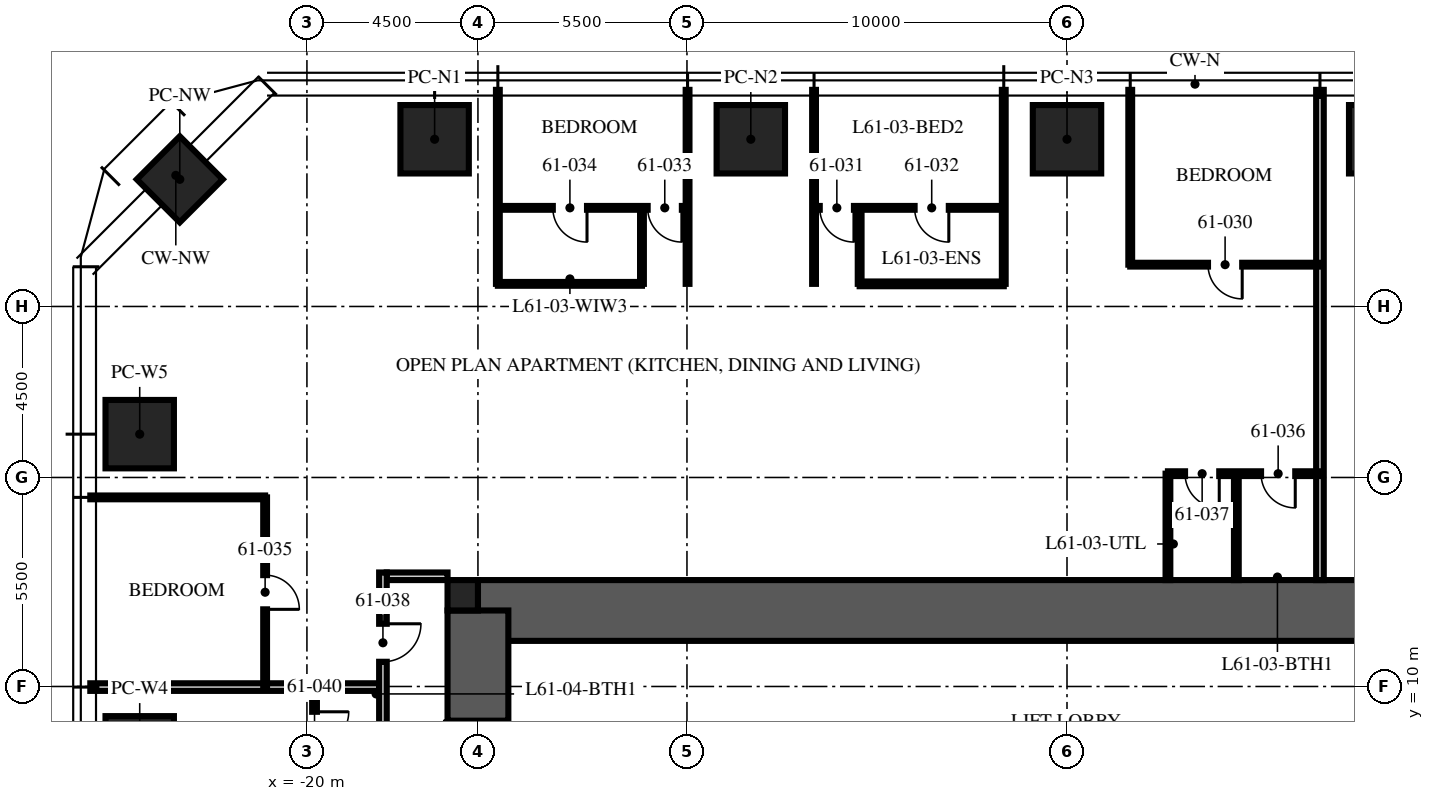
"""IFC4 building model, lengths in metres.
Left out: names, types, materials, properties, quantities, classifications, styles, units other than length and angle.
Written with IfcOpenShell. Run it as: python <this file> out.ifc"""

import sys

from ifc_helpers import new_model, si_unit, direction, frame, frame_2d, origin, origin_2d, place, context, subcontext, project, spatial, rectangle, extrude, element, fill, save


model = new_model("IFC4")
c1 = context("Model", 3, precision=1e-05, world=origin(), true_north=direction((0.0, 1.0)))
c2 = subcontext(c1, "Body", "Model", "MODEL_VIEW")
j1 = project(units=[si_unit("LENGTHUNIT", "METRE"), si_unit("PLANEANGLEUNIT", "RADIAN")], contexts=[c1])
p1 = place(None, origin())
s1 = spatial("IfcSite", under=j1, at=p1, CompositionType="ELEMENT")
p2 = place(p1, origin())
s2 = spatial("IfcBuilding", under=s1, at=p2, CompositionType="ELEMENT")
p3 = place(p2, frame((0.0, 0.0, 244.5)))
s3 = spatial("IfcBuildingStorey", under=s2, at=p3, CompositionType="ELEMENT", Elevation=244.5)
p4 = place(p3, frame((-15.5, 12.0, -0.25), z_axis=(0.0, 0.0, 1.0), x_axis=(1.0, 0.0, 0.0)))
e1 = element("IfcWall", 1, at=p4, inside=s3, PredefinedType="SHEAR", context=c2, shape_type="SweptSolid", body=[
    extrude(rectangle(XDim=31.0, YDim=1.6, at=frame_2d((15.5, 0.0))), origin(), (0.0, 0.0, 1.0), 3.75),
])
p5 = place(p3, frame((-15.5, -12.0, -0.25), z_axis=(0.0, 0.0, 1.0), x_axis=(0.0, 1.0, 0.0)))
e2 = element("IfcWall", 2, at=p5, inside=s3, PredefinedType="SHEAR", context=c2, shape_type="SweptSolid", body=[
    extrude(rectangle(XDim=24.0, YDim=1.6, at=frame_2d((12.0, 0.0))), origin(), (0.0, 0.0, 1.0), 3.75),
])
p6 = place(p5, frame((3.2, 0.0, 0.25)))
e3 = element("IfcOpeningElement", 3, at=p6, cuts=e2, PredefinedType="OPENING", context=c2, shape_type="SweptSolid", body=[
    extrude(rectangle(XDim=1.2, YDim=2.1, at=frame_2d((0.6, 1.05))), frame((0.0, 0.81, 0.0), z_axis=(0.0, -1.0, 0.0), x_axis=(1.0, 0.0, 0.0)), (0.0, 0.0, 1.0), 1.62),
])
p7 = place(p5, frame((19.3, 0.0, 0.25)))
e4 = element("IfcOpeningElement", 4, at=p7, cuts=e2, PredefinedType="OPENING", context=c2, shape_type="SweptSolid", body=[
    extrude(rectangle(XDim=1.8, YDim=2.1, at=frame_2d((0.9, 1.05))), frame((0.0, 0.81, 0.0), z_axis=(0.0, -1.0, 0.0), x_axis=(1.0, 0.0, 0.0)), (0.0, 0.0, 1.0), 1.62),
])
p8 = place(p3, frame((-15.9, 12.4, -0.25), z_axis=(0.0, 0.0, 1.0), x_axis=(1.0, 0.0, 0.0)))
e5 = element("IfcColumn", 5, at=p8, inside=s3, PredefinedType="COLUMN", context=c2, shape_type="SweptSolid", body=[
    extrude(rectangle(XDim=0.8, YDim=0.8, at=origin_2d()), origin(), (0.0, 0.0, 1.0), 3.75),
])
for number, where, z_axis, x_axis in (
    (6, (-16.64, 24.4, 0.0), (0.0, 0.0, 1.0), (1.0, 0.0, 0.0)),
    (7, (-8.32, 24.4, 0.0), (0.0, 0.0, 1.0), (1.0, 0.0, 0.0)),
    (8, (0.0, 24.4, 0.0), (0.0, 0.0, 1.0), (1.0, 0.0, 0.0)),
    (9, (8.32, 24.4, 0.0), (0.0, 0.0, 1.0), (1.0, 0.0, 0.0)),
    (10, (-24.4, 8.32, 0.0), (0.0, 0.0, 1.0), (0.0, 1.0, 0.0)),
    (11, (-24.4, 16.64, 0.0), (0.0, 0.0, 1.0), (0.0, 1.0, 0.0)),
):
    element("IfcColumn", number, at=place(p3, frame(where, z_axis=z_axis, x_axis=x_axis)), inside=s3, PredefinedType="COLUMN", context=c2, shape_type="SweptSolid", body=[
        extrude(rectangle(XDim=1.8, YDim=1.8, at=origin_2d()), origin(), (0.0, 0.0, 1.0), 3.75),
    ])
p9 = place(p3, frame((-23.346, 23.346, 0.0), z_axis=(0.0, 0.0, 1.0), x_axis=(0.707106781187, 0.707106781187, 0.0)))
e12 = element("IfcColumn", 12, at=p9, inside=s3, PredefinedType="COLUMN", context=c2, shape_type="SweptSolid", body=[
    extrude(rectangle(XDim=1.6, YDim=1.6, at=origin_2d()), origin(), (0.0, 0.0, 1.0), 3.75),
])
p10 = place(p3, frame((-16.3, 12.9, 0.0), z_axis=(0.0, 0.0, 1.0), x_axis=(-1.0, 0.0, 0.0)))
e13 = element("IfcWall", 13, at=p10, inside=s3, PredefinedType="PARTITIONING", context=c2, shape_type="SweptSolid", body=[
    extrude(rectangle(XDim=1.6, YDim=0.2, at=frame_2d((0.8, 0.0))), origin(), (0.0, 0.0, 1.0), 2.3),
])
p11 = place(p3, frame((6.656, 12.8, 0.0), z_axis=(0.0, 0.0, 1.0), x_axis=(0.0, 1.0, 0.0)))
e14 = element("IfcWall", 14, at=p11, inside=s3, PredefinedType="PARTITIONING", context=c2, shape_type="SweptSolid", body=[
    extrude(rectangle(XDim=12.9, YDim=0.2, at=frame_2d((6.45, 0.0))), origin(), (0.0, 0.0, 1.0), 2.91),
])
p12 = place(p3, frame((1.664, 21.1, 0.0), z_axis=(0.0, 0.0, 1.0), x_axis=(0.0, 1.0, 0.0)))
e15 = element("IfcWall", 15, at=p12, inside=s3, PredefinedType="PARTITIONING", context=c2, shape_type="SweptSolid", body=[
    extrude(rectangle(XDim=4.6, YDim=0.1, at=frame_2d((2.3, 0.0))), origin(), (0.0, 0.0, 1.0), 2.91),
])
for number, where, z_axis, x_axis in (
    (16, (-1.664, 20.595, 0.0), (0.0, 0.0, 1.0), (0.0, 1.0, 0.0)),
    (17, (-6.656, 20.595, 0.0), (0.0, 0.0, 1.0), (0.0, 1.0, 0.0)),
    (18, (-9.984, 20.595, 0.0), (0.0, 0.0, 1.0), (0.0, 1.0, 0.0)),
    (19, (-14.976, 20.595, 0.0), (0.0, 0.0, 1.0), (0.0, 1.0, 0.0)),
):
    element("IfcWall", number, at=place(p3, frame(where, z_axis=z_axis, x_axis=x_axis)), inside=s3, PredefinedType="PARTITIONING", context=c2, shape_type="SweptSolid", body=[
        extrude(rectangle(XDim=5.105, YDim=0.1, at=frame_2d((2.552, 0.0))), origin(), (0.0, 0.0, 1.0), 2.91),
    ])
p13 = place(p3, frame((-21.1, 14.976, 0.0), z_axis=(0.0, 0.0, 1.0), x_axis=(-1.0, 0.0, 0.0)))
e20 = element("IfcWall", 20, at=p13, inside=s3, PredefinedType="PARTITIONING", context=c2, shape_type="SweptSolid", body=[
    extrude(rectangle(XDim=4.6, YDim=0.1, at=frame_2d((2.3, 0.0))), origin(), (0.0, 0.0, 1.0), 2.91),
])
p14 = place(p3, frame((-18.1, 9.984, 0.0), z_axis=(0.0, 0.0, 1.0), x_axis=(-1.0, 0.0, 0.0)))
e21 = element("IfcWall", 21, at=p14, inside=s3, PredefinedType="PARTITIONING", context=c2, shape_type="SweptSolid", body=[
    extrude(rectangle(XDim=7.6, YDim=0.2, at=frame_2d((3.8, 0.0))), origin(), (0.0, 0.0, 1.0), 2.91),
])
p15 = place(p3, frame((6.656, 21.1, 0.0), z_axis=(0.0, 0.0, 1.0), x_axis=(-1.0, 0.0, 0.0)))
e22 = element("IfcWall", 22, at=p15, inside=s3, PredefinedType="PARTITIONING", context=c2, shape_type="SweptSolid", body=[
    extrude(rectangle(XDim=4.992, YDim=0.1, at=frame_2d((2.496, 0.0))), origin(), (0.0, 0.0, 1.0), 2.81),
])
p16 = place(p15, frame((2.046, 0.0, 0.0)))
e23 = element("IfcOpeningElement", 23, at=p16, cuts=e22, PredefinedType="OPENING", context=c2, shape_type="SweptSolid", body=[
    extrude(rectangle(XDim=0.9, YDim=2.1, at=frame_2d((0.45, 1.05))), frame((0.0, 0.06, 0.0), z_axis=(0.0, -1.0, 0.0), x_axis=(1.0, 0.0, 0.0)), (0.0, 0.0, 1.0), 0.12),
])
p17 = place(p3, frame((-1.664, 22.595, 0.0), z_axis=(0.0, 0.0, 1.0), x_axis=(-1.0, 0.0, 0.0)))
e24 = element("IfcWall", 24, at=p17, inside=s3, PredefinedType="PARTITIONING", context=c2, shape_type="SweptSolid", body=[
    extrude(rectangle(XDim=4.992, YDim=0.1, at=frame_2d((2.496, 0.0))), origin(), (0.0, 0.0, 1.0), 2.81),
])
p18 = place(p17, frame((3.942, 0.0, 0.0)))
e25 = element("IfcOpeningElement", 25, at=p18, cuts=e24, PredefinedType="OPENING", context=c2, shape_type="SweptSolid", body=[
    extrude(rectangle(XDim=0.9, YDim=2.1, at=frame_2d((0.45, 1.05))), frame((0.0, 0.06, 0.0), z_axis=(0.0, -1.0, 0.0), x_axis=(1.0, 0.0, 0.0)), (0.0, 0.0, 1.0), 0.12),
])
p19 = place(p17, frame((1.446, 0.0, 0.0)))
e26 = element("IfcOpeningElement", 26, at=p19, cuts=e24, PredefinedType="OPENING", context=c2, shape_type="SweptSolid", body=[
    extrude(rectangle(XDim=0.9, YDim=2.1, at=frame_2d((0.45, 1.05))), frame((0.0, 0.06, 0.0), z_axis=(0.0, -1.0, 0.0), x_axis=(1.0, 0.0, 0.0)), (0.0, 0.0, 1.0), 0.12),
])
p20 = place(p3, frame((-5.456, 20.595, 0.0), z_axis=(0.0, 0.0, 1.0), x_axis=(0.0, 1.0, 0.0)))
e27 = element("IfcWall", 27, at=p20, inside=s3, PredefinedType="PARTITIONING", context=c2, shape_type="SweptSolid", body=[
    extrude(rectangle(XDim=2.0, YDim=0.1, at=frame_2d((1.0, 0.0))), origin(), (0.0, 0.0, 1.0), 3.5),
])
p21 = place(p3, frame((-1.664, 20.595, 0.0), z_axis=(0.0, 0.0, 1.0), x_axis=(-1.0, 0.0, 0.0)))
e28 = element("IfcWall", 28, at=p21, inside=s3, PredefinedType="PARTITIONING", context=c2, shape_type="SweptSolid", body=[
    extrude(rectangle(XDim=3.792, YDim=0.125, at=frame_2d((1.896, 0.0))), origin(), (0.0, 0.0, 1.0), 2.81),
])
p22 = place(p3, frame((-9.984, 22.595, 0.0), z_axis=(0.0, 0.0, 1.0), x_axis=(-1.0, 0.0, 0.0)))
e29 = element("IfcWall", 29, at=p22, inside=s3, PredefinedType="PARTITIONING", context=c2, shape_type="SweptSolid", body=[
    extrude(rectangle(XDim=4.992, YDim=0.1, at=frame_2d((2.496, 0.0))), origin(), (0.0, 0.0, 1.0), 2.81),
])
p23 = place(p22, frame((0.15, 0.0, 0.0)))
e30 = element("IfcOpeningElement", 30, at=p23, cuts=e29, PredefinedType="OPENING", context=c2, shape_type="SweptSolid", body=[
    extrude(rectangle(XDim=0.9, YDim=2.1, at=frame_2d((0.45, 1.05))), frame((0.0, 0.06, 0.0), z_axis=(0.0, -1.0, 0.0), x_axis=(1.0, 0.0, 0.0)), (0.0, 0.0, 1.0), 0.12),
])
p24 = place(p22, frame((2.646, 0.0, 0.0)))
e31 = element("IfcOpeningElement", 31, at=p24, cuts=e29, PredefinedType="OPENING", context=c2, shape_type="SweptSolid", body=[
    extrude(rectangle(XDim=0.9, YDim=2.1, at=frame_2d((0.45, 1.05))), frame((0.0, 0.06, 0.0), z_axis=(0.0, -1.0, 0.0), x_axis=(1.0, 0.0, 0.0)), (0.0, 0.0, 1.0), 0.12),
])
p25 = place(p3, frame((-11.184, 20.595, 0.0), z_axis=(0.0, 0.0, 1.0), x_axis=(0.0, 1.0, 0.0)))
e32 = element("IfcWall", 32, at=p25, inside=s3, PredefinedType="PARTITIONING", context=c2, shape_type="SweptSolid", body=[
    extrude(rectangle(XDim=2.0, YDim=0.1, at=frame_2d((1.0, 0.0))), origin(), (0.0, 0.0, 1.0), 3.5),
])
p26 = place(p3, frame((-11.184, 20.595, 0.0), z_axis=(0.0, 0.0, 1.0), x_axis=(-1.0, 0.0, 0.0)))
e33 = element("IfcWall", 33, at=p26, inside=s3, PredefinedType="PARTITIONING", context=c2, shape_type="SweptSolid", body=[
    extrude(rectangle(XDim=3.792, YDim=0.1, at=frame_2d((1.896, 0.0))), origin(), (0.0, 0.0, 1.0), 2.81),
])
p27 = place(p3, frame((-21.1, 14.976, 0.0), z_axis=(0.0, 0.0, 1.0), x_axis=(0.0, -1.0, 0.0)))
e34 = element("IfcWall", 34, at=p27, inside=s3, PredefinedType="PARTITIONING", context=c2, shape_type="SweptSolid", body=[
    extrude(rectangle(XDim=4.992, YDim=0.1, at=frame_2d((2.496, 0.0))), origin(), (0.0, 0.0, 1.0), 2.81),
])
p28 = place(p27, frame((2.046, 0.0, 0.0)))
e35 = element("IfcOpeningElement", 35, at=p28, cuts=e34, PredefinedType="OPENING", context=c2, shape_type="SweptSolid", body=[
    extrude(rectangle(XDim=0.9, YDim=2.1, at=frame_2d((0.45, 1.05))), frame((0.0, 0.06, 0.0), z_axis=(0.0, -1.0, 0.0), x_axis=(1.0, 0.0, 0.0)), (0.0, 0.0, 1.0), 0.12),
])
p29 = place(p3, frame((6.656, 15.6, 0.0), z_axis=(0.0, 0.0, 1.0), x_axis=(-1.0, 0.0, 0.0)))
e36 = element("IfcWall", 36, at=p29, inside=s3, PredefinedType="PARTITIONING", context=c2, shape_type="SweptSolid", body=[
    extrude(rectangle(XDim=4.0, YDim=0.125, at=frame_2d((2.0, 0.0))), origin(), (0.0, 0.0, 1.0), 2.81),
])
p30 = place(p29, frame((0.65, 0.0, 0.0)))
e37 = element("IfcOpeningElement", 37, at=p30, cuts=e36, PredefinedType="OPENING", context=c2, shape_type="SweptSolid", body=[
    extrude(rectangle(XDim=0.9, YDim=2.1, at=frame_2d((0.45, 1.05))), frame((0.0, 0.073, 0.0), z_axis=(0.0, -1.0, 0.0), x_axis=(1.0, 0.0, 0.0)), (0.0, 0.0, 1.0), 0.145),
])
p31 = place(p29, frame((2.65, 0.0, 0.0)))
e38 = element("IfcOpeningElement", 38, at=p31, cuts=e36, PredefinedType="OPENING", context=c2, shape_type="SweptSolid", body=[
    extrude(rectangle(XDim=0.9, YDim=2.1, at=frame_2d((0.45, 1.05))), frame((0.0, 0.073, 0.0), z_axis=(0.0, -1.0, 0.0), x_axis=(1.0, 0.0, 0.0)), (0.0, 0.0, 1.0), 0.145),
])
for number, where, z_axis, x_axis in (
    (39, (4.456, 12.8, 0.0), (0.0, 0.0, 1.0), (0.0, 1.0, 0.0)),
    (40, (2.656, 12.8, 0.0), (0.0, 0.0, 1.0), (0.0, 1.0, 0.0)),
):
    element("IfcWall", number, at=place(p3, frame(where, z_axis=z_axis, x_axis=x_axis)), inside=s3, PredefinedType="PARTITIONING", context=c2, shape_type="SweptSolid", body=[
        extrude(rectangle(XDim=2.8, YDim=0.125, at=frame_2d((1.4, 0.0))), origin(), (0.0, 0.0, 1.0), 3.5),
    ])
p32 = place(p3, frame((-19.8, 9.984, 0.0), z_axis=(0.0, 0.0, 1.0), x_axis=(0.0, -1.0, 0.0)))
e41 = element("IfcWall", 41, at=p32, inside=s3, PredefinedType="PARTITIONING", context=c2, shape_type="SweptSolid", body=[
    extrude(rectangle(XDim=2.2, YDim=0.125, at=frame_2d((1.1, 0.0))), origin(), (0.0, 0.0, 1.0), 2.6),
])
p33 = place(p32, frame((0.65, 0.0, 0.0)))
e42 = element("IfcOpeningElement", 42, at=p33, cuts=e41, PredefinedType="OPENING", context=c2, shape_type="SweptSolid", body=[
    extrude(rectangle(XDim=0.9, YDim=2.1, at=frame_2d((0.45, 1.05))), frame((0.0, 0.073, 0.0), z_axis=(0.0, -1.0, 0.0), x_axis=(1.0, 0.0, 0.0)), (0.0, 0.0, 1.0), 0.145),
])
p34 = place(p3, frame((-18.0, 13.0, 0.0), z_axis=(0.0, 0.0, 1.0), x_axis=(0.0, -1.0, 0.0)))
e43 = element("IfcWall", 43, at=p34, inside=s3, PredefinedType="PARTITIONING", context=c2, shape_type="SweptSolid", body=[
    extrude(rectangle(XDim=25.8, YDim=0.2, at=frame_2d((12.9, 0.0))), origin(), (0.0, 0.0, 1.0), 2.6),
])
p35 = place(p34, frame((1.35, 0.0, 0.0)))
e44 = element("IfcOpeningElement", 44, at=p35, cuts=e43, PredefinedType="OPENING", context=c2, shape_type="SweptSolid", body=[
    extrude(rectangle(XDim=1.0, YDim=2.2, at=frame_2d((0.5, 1.1))), frame((0.0, 0.11, 0.0), z_axis=(0.0, -1.0, 0.0), x_axis=(1.0, 0.0, 0.0)), (0.0, 0.0, 1.0), 0.22),
])
p36 = place(p34, frame((9.786, 0.0, 0.0)))
e45 = element("IfcOpeningElement", 45, at=p36, cuts=e43, PredefinedType="OPENING", context=c2, shape_type="SweptSolid", body=[
    extrude(rectangle(XDim=1.0, YDim=2.2, at=frame_2d((0.5, 1.1))), frame((0.0, 0.11, 0.0), z_axis=(0.0, -1.0, 0.0), x_axis=(1.0, 0.0, 0.0)), (0.0, 0.0, 1.0), 0.22),
])
p37 = place(p34, frame((23.856, 0.0, 0.0)))
e46 = element("IfcOpeningElement", 46, at=p37, cuts=e43, PredefinedType="OPENING", context=c2, shape_type="SweptSolid", body=[
    extrude(rectangle(XDim=1.0, YDim=2.2, at=frame_2d((0.5, 1.1))), frame((0.0, 0.11, 0.0), z_axis=(0.0, -1.0, 0.0), x_axis=(1.0, 0.0, 0.0)), (0.0, 0.0, 1.0), 0.22),
])
p38 = place(p7, origin())
e47 = element("IfcDoor", 47, at=p38, inside=s3, OperationType="DOUBLE_DOOR_SINGLE_SWING", PredefinedType="DOOR", context=c2, shape_type="SweptSolid", body=[
    extrude(rectangle(XDim=1.8, YDim=2.1, at=frame_2d((0.9, 1.05))), frame((0.0, 0.025, 0.0), z_axis=(0.0, -1.0, 0.0), x_axis=(1.0, 0.0, 0.0)), (0.0, 0.0, 1.0), 0.05),
])
fill(e4, e47)
p39 = place(p16, origin())
e48 = element("IfcDoor", 48, at=p39, inside=s3, OperationType="SINGLE_SWING_LEFT", PredefinedType="DOOR", context=c2, shape_type="SweptSolid", body=[
    extrude(rectangle(XDim=0.9, YDim=2.1, at=frame_2d((0.45, 1.05))), frame((0.0, 0.025, 0.0), z_axis=(0.0, -1.0, 0.0), x_axis=(1.0, 0.0, 0.0)), (0.0, 0.0, 1.0), 0.05),
])
fill(e23, e48)
p40 = place(p18, origin())
e49 = element("IfcDoor", 49, at=p40, inside=s3, OperationType="SINGLE_SWING_LEFT", PredefinedType="DOOR", context=c2, shape_type="SweptSolid", body=[
    extrude(rectangle(XDim=0.9, YDim=2.1, at=frame_2d((0.45, 1.05))), frame((0.0, 0.025, 0.0), z_axis=(0.0, -1.0, 0.0), x_axis=(1.0, 0.0, 0.0)), (0.0, 0.0, 1.0), 0.05),
])
fill(e25, e49)
p41 = place(p19, origin())
e50 = element("IfcDoor", 50, at=p41, inside=s3, OperationType="SINGLE_SWING_LEFT", PredefinedType="DOOR", context=c2, shape_type="SweptSolid", body=[
    extrude(rectangle(XDim=0.9, YDim=2.1, at=frame_2d((0.45, 1.05))), frame((0.0, 0.025, 0.0), z_axis=(0.0, -1.0, 0.0), x_axis=(1.0, 0.0, 0.0)), (0.0, 0.0, 1.0), 0.05),
])
fill(e26, e50)
p42 = place(p23, origin())
e51 = element("IfcDoor", 51, at=p42, inside=s3, OperationType="SINGLE_SWING_LEFT", PredefinedType="DOOR", context=c2, shape_type="SweptSolid", body=[
    extrude(rectangle(XDim=0.9, YDim=2.1, at=frame_2d((0.45, 1.05))), frame((0.0, 0.025, 0.0), z_axis=(0.0, -1.0, 0.0), x_axis=(1.0, 0.0, 0.0)), (0.0, 0.0, 1.0), 0.05),
])
fill(e30, e51)
p43 = place(p24, origin())
e52 = element("IfcDoor", 52, at=p43, inside=s3, OperationType="SINGLE_SWING_LEFT", PredefinedType="DOOR", context=c2, shape_type="SweptSolid", body=[
    extrude(rectangle(XDim=0.9, YDim=2.1, at=frame_2d((0.45, 1.05))), frame((0.0, 0.025, 0.0), z_axis=(0.0, -1.0, 0.0), x_axis=(1.0, 0.0, 0.0)), (0.0, 0.0, 1.0), 0.05),
])
fill(e31, e52)
p44 = place(p28, origin())
e53 = element("IfcDoor", 53, at=p44, inside=s3, OperationType="SINGLE_SWING_RIGHT", PredefinedType="DOOR", context=c2, shape_type="SweptSolid", body=[
    extrude(rectangle(XDim=0.9, YDim=2.1, at=frame_2d((0.45, 1.05))), frame((0.0, 0.025, 0.0), z_axis=(0.0, -1.0, 0.0), x_axis=(1.0, 0.0, 0.0)), (0.0, 0.0, 1.0), 0.05),
])
fill(e35, e53)
p45 = place(p30, origin())
e54 = element("IfcDoor", 54, at=p45, inside=s3, OperationType="SINGLE_SWING_LEFT", PredefinedType="DOOR", context=c2, shape_type="SweptSolid", body=[
    extrude(rectangle(XDim=0.9, YDim=2.1, at=frame_2d((0.45, 1.05))), frame((0.0, 0.025, 0.0), z_axis=(0.0, -1.0, 0.0), x_axis=(1.0, 0.0, 0.0)), (0.0, 0.0, 1.0), 0.05),
])
fill(e37, e54)
p46 = place(p31, origin())
e55 = element("IfcDoor", 55, at=p46, inside=s3, OperationType="SINGLE_SWING_LEFT", PredefinedType="DOOR", context=c2, shape_type="SweptSolid", body=[
    extrude(rectangle(XDim=0.9, YDim=2.1, at=frame_2d((0.45, 1.05))), frame((0.0, 0.025, 0.0), z_axis=(0.0, -1.0, 0.0), x_axis=(1.0, 0.0, 0.0)), (0.0, 0.0, 1.0), 0.05),
])
fill(e38, e55)
p47 = place(p35, origin())
e56 = element("IfcDoor", 56, at=p47, inside=s3, OperationType="SINGLE_SWING_LEFT", PredefinedType="DOOR", context=c2, shape_type="SweptSolid", body=[
    extrude(rectangle(XDim=1.0, YDim=2.2, at=frame_2d((0.5, 1.1))), frame((0.0, 0.025, 0.0), z_axis=(0.0, -1.0, 0.0), x_axis=(1.0, 0.0, 0.0)), (0.0, 0.0, 1.0), 0.05),
])
fill(e44, e56)
p48 = place(p33, origin())
e57 = element("IfcDoor", 57, at=p48, inside=s3, OperationType="SINGLE_SWING_LEFT", PredefinedType="DOOR", context=c2, shape_type="SweptSolid", body=[
    extrude(rectangle(XDim=0.9, YDim=2.1, at=frame_2d((0.45, 1.05))), frame((0.0, 0.025, 0.0), z_axis=(0.0, -1.0, 0.0), x_axis=(1.0, 0.0, 0.0)), (0.0, 0.0, 1.0), 0.05),
])
fill(e42, e57)
save(model, sys.argv[1])
